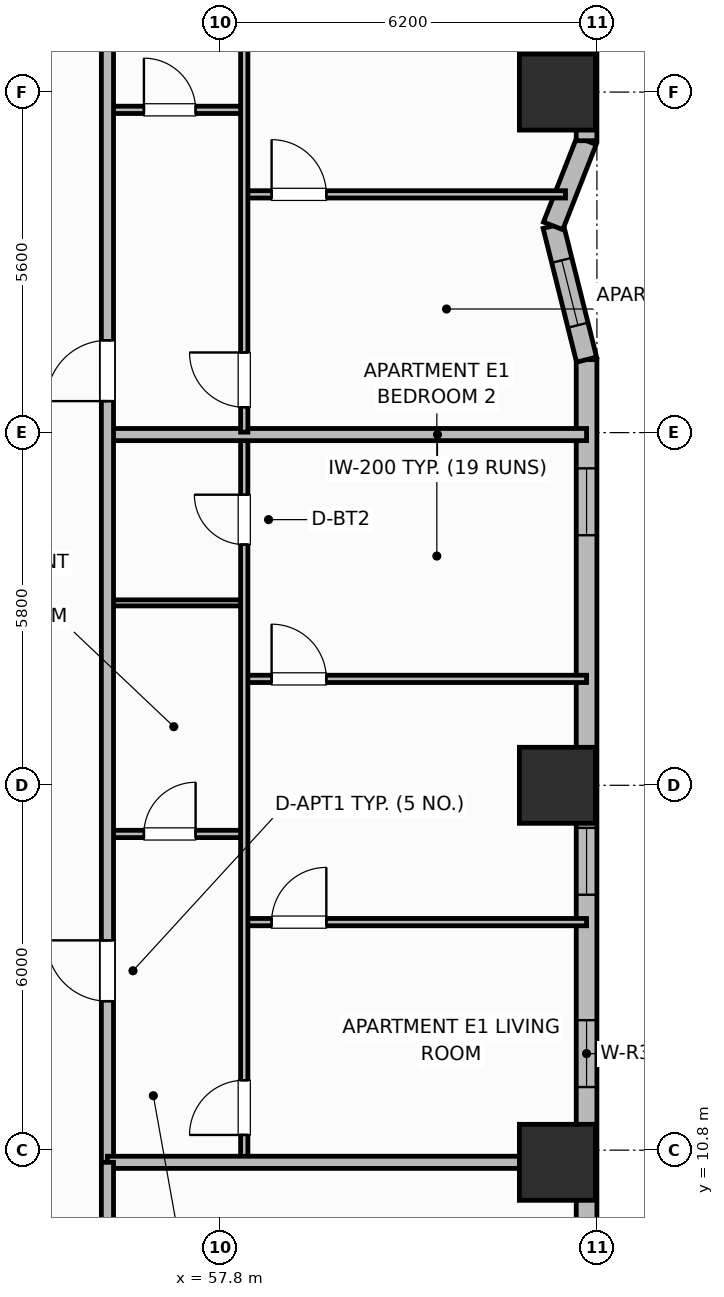
"""IFC4 building model, lengths in metres.
Left out: names, types, materials, properties, quantities, classifications, styles, units other than length and angle.
Written with IfcOpenShell. Run it as: python <this file> out.ifc"""

import sys

from ifc_helpers import new_model, si_unit, direction, frame, frame_2d, origin, origin_2d, place, context, subcontext, project, spatial, rectangle, extrude, element, fill, save


model = new_model("IFC4")
c1 = context("Model", 3, precision=1e-05, world=origin(), true_north=direction((0.0, 1.0)))
c2 = subcontext(c1, "Body", "Model", "MODEL_VIEW")
j1 = project(units=[si_unit("LENGTHUNIT", "METRE"), si_unit("PLANEANGLEUNIT", "RADIAN")], contexts=[c1])
p1 = place(None, origin())
s1 = spatial("IfcSite", under=j1, at=p1, CompositionType="ELEMENT")
p2 = place(p1, origin())
s2 = spatial("IfcBuilding", under=s1, at=p2, CompositionType="ELEMENT")
p3 = place(p2, frame((0.0, 0.0, 32.5)))
s3 = spatial("IfcBuildingStorey", under=s2, at=p3, CompositionType="ELEMENT", Elevation=32.5)
for number, where, z_axis, x_axis in (
    (1, (63.35, 10.6, 0.0), (0.0, 0.0, 1.0), (1.0, 0.0, 0.0)),
    (2, (63.35, 16.8, 0.0), (0.0, 0.0, 1.0), (1.0, 0.0, 0.0)),
    (3, (63.35, 28.2, 0.0), (0.0, 0.0, 1.0), (1.0, 0.0, 0.0)),
):
    element("IfcColumn", number, at=place(p3, frame(where, z_axis=z_axis, x_axis=x_axis)), inside=s3, PredefinedType="COLUMN", context=c2, shape_type="SweptSolid", body=[
        extrude(rectangle(XDim=1.25, YDim=1.25, at=origin_2d()), origin(), (0.0, 0.0, 1.0), 3.7),
    ])
p4 = place(p3, frame((63.83, 9.0, 0.0), z_axis=(0.0, 0.0, 1.0), x_axis=(0.0, 1.0, 0.0)))
e4 = element("IfcWall", 4, at=p4, inside=s3, PredefinedType="SOLIDWALL", context=c2, shape_type="SweptSolid", body=[
    extrude(rectangle(XDim=14.8, YDim=0.34, at=frame_2d((7.4, 0.0))), origin(), (0.0, 0.0, 1.0), 2.7),
])
p5 = place(p4, frame((2.837, 0.0, 0.93)))
e5 = element("IfcOpeningElement", 5, at=p5, cuts=e4, PredefinedType="OPENING", context=c2, shape_type="SweptSolid", body=[
    extrude(rectangle(XDim=1.1, YDim=1.65, at=frame_2d((0.55, 0.825))), frame((0.0, 0.18, 0.0), z_axis=(0.0, -1.0, 0.0), x_axis=(1.0, 0.0, 0.0)), (0.0, 0.0, 1.0), 0.36),
])
p6 = place(p4, frame((6.0, 0.0, 0.89)))
e6 = element("IfcOpeningElement", 6, at=p6, cuts=e4, PredefinedType="OPENING", context=c2, shape_type="SweptSolid", body=[
    extrude(rectangle(XDim=1.1, YDim=1.65, at=frame_2d((0.55, 0.825))), frame((0.0, 0.18, 0.0), z_axis=(0.0, -1.0, 0.0), x_axis=(1.0, 0.0, 0.0)), (0.0, 0.0, 1.0), 0.36),
])
p7 = place(p4, frame((11.913, 0.0, 0.93)))
e7 = element("IfcOpeningElement", 7, at=p7, cuts=e4, PredefinedType="OPENING", context=c2, shape_type="SweptSolid", body=[
    extrude(rectangle(XDim=1.1, YDim=1.65, at=frame_2d((0.55, 0.825))), frame((0.0, 0.18, 0.0), z_axis=(0.0, -1.0, 0.0), x_axis=(1.0, 0.0, 0.0)), (0.0, 0.0, 1.0), 0.36),
])
p8 = place(p3, frame((63.83, 23.8, 0.0), z_axis=(0.0, 0.0, 1.0), x_axis=(-0.242560957029, 0.970136166796, 0.0)))
e8 = element("IfcWall", 8, at=p8, inside=s3, PredefinedType="SOLIDWALL", context=c2, shape_type="SweptSolid", body=[
    extrude(rectangle(XDim=2.268, YDim=0.34, at=frame_2d((1.134, 0.0))), origin(), (0.0, 0.0, 1.0), 2.7),
])
p9 = place(p8, frame((0.584, 0.0, 0.89)))
e9 = element("IfcOpeningElement", 9, at=p9, cuts=e8, PredefinedType="OPENING", context=c2, shape_type="SweptSolid", body=[
    extrude(rectangle(XDim=1.1, YDim=1.65, at=frame_2d((0.55, 0.825))), frame((0.0, 0.18, 0.0), z_axis=(0.0, -1.0, 0.0), x_axis=(1.0, 0.0, 0.0)), (0.0, 0.0, 1.0), 0.36),
])
p10 = place(p3, frame((63.28, 26.0, 0.0), z_axis=(0.0, 0.0, 1.0), x_axis=(0.365702591843, 0.930731762818, 0.0)))
e10 = element("IfcWall", 10, at=p10, inside=s3, PredefinedType="SOLIDWALL", context=c2, shape_type="SweptSolid", body=[
    extrude(rectangle(XDim=1.504, YDim=0.34, at=frame_2d((0.752, 0.0))), origin(), (0.0, 0.0, 1.0), 2.7),
])
p11 = place(p3, frame((63.83, 27.4, 0.0), z_axis=(0.0, 0.0, 1.0), x_axis=(0.0, 1.0, 0.0)))
e11 = element("IfcWall", 11, at=p11, inside=s3, PredefinedType="SOLIDWALL", context=c2, shape_type="SweptSolid", body=[
    extrude(rectangle(XDim=1.6, YDim=0.34, at=frame_2d((0.8, 0.0))), origin(), (0.0, 0.0, 1.0), 2.7),
])
p12 = place(p3, frame((55.95, 16.0, 0.0), z_axis=(0.0, 0.0, 1.0), x_axis=(1.0, 0.0, 0.0)))
e12 = element("IfcWall", 12, at=p12, inside=s3, PredefinedType="PARTITIONING", context=c2, shape_type="SweptSolid", body=[
    extrude(rectangle(XDim=2.25, YDim=0.12, at=frame_2d((1.125, 0.0))), origin(), (0.0, 0.0, 1.0), 2.53),
])
p13 = place(p12, frame((0.6, 0.0, 0.0)))
e13 = element("IfcOpeningElement", 13, at=p13, cuts=e12, PredefinedType="OPENING", context=c2, shape_type="SweptSolid", body=[
    extrude(rectangle(XDim=0.85, YDim=2.1, at=frame_2d((0.425, 1.05))), frame((0.0, 0.07, 0.0), z_axis=(0.0, -1.0, 0.0), x_axis=(1.0, 0.0, 0.0)), (0.0, 0.0, 1.0), 0.14),
])
p14 = place(p3, frame((55.95, 19.8, 0.0), z_axis=(0.0, 0.0, 1.0), x_axis=(1.0, 0.0, 0.0)))
e14 = element("IfcWall", 14, at=p14, inside=s3, PredefinedType="PARTITIONING", context=c2, shape_type="SweptSolid", body=[
    extrude(rectangle(XDim=2.25, YDim=0.1, at=frame_2d((1.125, 0.0))), origin(), (0.0, 0.0, 1.0), 2.53),
])
p15 = place(p3, frame((58.2, 14.55, 0.0), z_axis=(0.0, 0.0, 1.0), x_axis=(1.0, 0.0, 0.0)))
e15 = element("IfcWall", 15, at=p15, inside=s3, PredefinedType="PARTITIONING", context=c2, shape_type="SweptSolid", body=[
    extrude(rectangle(XDim=5.63, YDim=0.12, at=frame_2d((2.815, 0.0))), origin(), (0.0, 0.0, 1.0), 2.53),
])
p16 = place(p15, frame((0.45, 0.0, 0.0)))
e16 = element("IfcOpeningElement", 16, at=p16, cuts=e15, PredefinedType="OPENING", context=c2, shape_type="SweptSolid", body=[
    extrude(rectangle(XDim=0.9, YDim=2.1, at=frame_2d((0.45, 1.05))), frame((0.0, 0.07, 0.0), z_axis=(0.0, -1.0, 0.0), x_axis=(1.0, 0.0, 0.0)), (0.0, 0.0, 1.0), 0.14),
])
p17 = place(p3, frame((58.2, 18.55, 0.0), z_axis=(0.0, 0.0, 1.0), x_axis=(1.0, 0.0, 0.0)))
e17 = element("IfcWall", 17, at=p17, inside=s3, PredefinedType="PARTITIONING", context=c2, shape_type="SweptSolid", body=[
    extrude(rectangle(XDim=5.63, YDim=0.12, at=frame_2d((2.815, 0.0))), origin(), (0.0, 0.0, 1.0), 2.53),
])
p18 = place(p17, frame((0.45, 0.0, 0.0)))
e18 = element("IfcOpeningElement", 18, at=p18, cuts=e17, PredefinedType="OPENING", context=c2, shape_type="SweptSolid", body=[
    extrude(rectangle(XDim=0.9, YDim=2.1, at=frame_2d((0.45, 1.05))), frame((0.0, 0.07, 0.0), z_axis=(0.0, -1.0, 0.0), x_axis=(1.0, 0.0, 0.0)), (0.0, 0.0, 1.0), 0.14),
])
p19 = place(p3, frame((58.2, 10.64, 0.0), z_axis=(0.0, 0.0, 1.0), x_axis=(0.0, 1.0, 0.0)))
e19 = element("IfcWall", 19, at=p19, inside=s3, PredefinedType="PARTITIONING", context=c2, shape_type="SweptSolid", body=[
    extrude(rectangle(XDim=11.888, YDim=0.12, at=frame_2d((5.944, 0.0))), origin(), (0.0, 0.0, 1.0), 2.53),
])
p20 = place(p19, frame((0.41, 0.0, 0.0)))
e20 = element("IfcOpeningElement", 20, at=p20, cuts=e19, PredefinedType="OPENING", context=c2, shape_type="SweptSolid", body=[
    extrude(rectangle(XDim=0.9, YDim=2.1, at=frame_2d((0.45, 1.05))), frame((0.0, 0.07, 0.0), z_axis=(0.0, -1.0, 0.0), x_axis=(1.0, 0.0, 0.0)), (0.0, 0.0, 1.0), 0.14),
])
p21 = place(p19, frame((10.119, 0.0, 0.0)))
e21 = element("IfcOpeningElement", 21, at=p21, cuts=e19, PredefinedType="OPENING", context=c2, shape_type="SweptSolid", body=[
    extrude(rectangle(XDim=0.82, YDim=2.08, at=frame_2d((0.41, 1.04))), frame((0.0, 0.07, 0.0), z_axis=(0.0, -1.0, 0.0), x_axis=(1.0, 0.0, 0.0)), (0.0, 0.0, 1.0), 0.14),
])
p22 = place(p3, frame((55.95, 22.568, 0.0), z_axis=(0.0, 0.0, 1.0), x_axis=(1.0, 0.0, 0.0)))
e22 = element("IfcWall", 22, at=p22, inside=s3, PredefinedType="PARTITIONING", context=c2, shape_type="SweptSolid", body=[
    extrude(rectangle(XDim=7.88, YDim=0.2, at=frame_2d((3.94, 0.0))), origin(), (0.0, 0.0, 1.0), 2.53),
])
p23 = place(p3, frame((55.95, 27.908, 0.0), z_axis=(0.0, 0.0, 1.0), x_axis=(1.0, 0.0, 0.0)))
e23 = element("IfcWall", 23, at=p23, inside=s3, PredefinedType="PARTITIONING", context=c2, shape_type="SweptSolid", body=[
    extrude(rectangle(XDim=2.25, YDim=0.12, at=frame_2d((1.125, 0.0))), origin(), (0.0, 0.0, 1.0), 2.53),
])
p24 = place(p23, frame((0.6, 0.0, 0.0)))
e24 = element("IfcOpeningElement", 24, at=p24, cuts=e23, PredefinedType="OPENING", context=c2, shape_type="SweptSolid", body=[
    extrude(rectangle(XDim=0.85, YDim=2.1, at=frame_2d((0.425, 1.05))), frame((0.0, 0.07, 0.0), z_axis=(0.0, -1.0, 0.0), x_axis=(1.0, 0.0, 0.0)), (0.0, 0.0, 1.0), 0.14),
])
p25 = place(p3, frame((58.2, 26.518, 0.0), z_axis=(0.0, 0.0, 1.0), x_axis=(1.0, 0.0, 0.0)))
e25 = element("IfcWall", 25, at=p25, inside=s3, PredefinedType="PARTITIONING", context=c2, shape_type="SweptSolid", body=[
    extrude(rectangle(XDim=5.283, YDim=0.12, at=frame_2d((2.642, 0.0))), origin(), (0.0, 0.0, 1.0), 2.53),
])
p26 = place(p25, frame((0.45, 0.0, 0.0)))
e26 = element("IfcOpeningElement", 26, at=p26, cuts=e25, PredefinedType="OPENING", context=c2, shape_type="SweptSolid", body=[
    extrude(rectangle(XDim=0.9, YDim=2.1, at=frame_2d((0.45, 1.05))), frame((0.0, 0.07, 0.0), z_axis=(0.0, -1.0, 0.0), x_axis=(1.0, 0.0, 0.0)), (0.0, 0.0, 1.0), 0.14),
])
p27 = place(p3, frame((58.2, 22.608, 0.0), z_axis=(0.0, 0.0, 1.0), x_axis=(0.0, 1.0, 0.0)))
e27 = element("IfcWall", 27, at=p27, inside=s3, PredefinedType="PARTITIONING", context=c2, shape_type="SweptSolid", body=[
    extrude(rectangle(XDim=11.052, YDim=0.12, at=frame_2d((5.526, 0.0))), origin(), (0.0, 0.0, 1.0), 2.53),
])
p28 = place(p27, frame((0.41, 0.0, 0.0)))
e28 = element("IfcOpeningElement", 28, at=p28, cuts=e27, PredefinedType="OPENING", context=c2, shape_type="SweptSolid", body=[
    extrude(rectangle(XDim=0.9, YDim=2.1, at=frame_2d((0.45, 1.05))), frame((0.0, 0.07, 0.0), z_axis=(0.0, -1.0, 0.0), x_axis=(1.0, 0.0, 0.0)), (0.0, 0.0, 1.0), 0.14),
])
p29 = place(p3, frame((55.95, 10.6, 0.0), z_axis=(0.0, 0.0, 1.0), x_axis=(0.0, 1.0, 0.0)))
e29 = element("IfcWall", 29, at=p29, inside=s3, PredefinedType="PARTITIONING", context=c2, shape_type="SweptSolid", body=[
    extrude(rectangle(XDim=35.2, YDim=0.2, at=frame_2d((17.6, 0.0))), origin(), (0.0, 0.0, 1.0), 2.53),
])
p30 = place(p29, frame((2.65, 0.0, 0.0)))
e30 = element("IfcOpeningElement", 30, at=p30, cuts=e29, PredefinedType="OPENING", context=c2, shape_type="SweptSolid", body=[
    extrude(rectangle(XDim=1.0, YDim=2.15, at=frame_2d((0.5, 1.075))), frame((0.0, 0.11, 0.0), z_axis=(0.0, -1.0, 0.0), x_axis=(1.0, 0.0, 0.0)), (0.0, 0.0, 1.0), 0.22),
])
p31 = place(p29, frame((12.518, 0.0, 0.0)))
e31 = element("IfcOpeningElement", 31, at=p31, cuts=e29, PredefinedType="OPENING", context=c2, shape_type="SweptSolid", body=[
    extrude(rectangle(XDim=1.0, YDim=2.15, at=frame_2d((0.5, 1.075))), frame((0.0, 0.11, 0.0), z_axis=(0.0, -1.0, 0.0), x_axis=(1.0, 0.0, 0.0)), (0.0, 0.0, 1.0), 0.22),
])
p32 = place(p29, frame((23.65, 0.0, 0.0)))
e32 = element("IfcOpeningElement", 32, at=p32, cuts=e29, PredefinedType="OPENING", context=c2, shape_type="SweptSolid", body=[
    extrude(rectangle(XDim=1.0, YDim=2.15, at=frame_2d((0.5, 1.075))), frame((0.0, 0.11, 0.0), z_axis=(0.0, -1.0, 0.0), x_axis=(1.0, 0.0, 0.0)), (0.0, 0.0, 1.0), 0.22),
])
p33 = place(p3, frame((55.95, 10.6, 0.0), z_axis=(0.0, 0.0, 1.0), x_axis=(1.0, 0.0, 0.0)))
e33 = element("IfcWall", 33, at=p33, inside=s3, PredefinedType="PARTITIONING", context=c2, shape_type="SweptSolid", body=[
    extrude(rectangle(XDim=7.46, YDim=0.2, at=frame_2d((3.73, 0.0))), origin(), (0.0, 0.0, 1.0), 2.53),
])
p34 = place(p3, frame((55.95, 4.97, 0.0), z_axis=(0.0, 0.0, 1.0), x_axis=(0.0, 1.0, 0.0)))
e34 = element("IfcWall", 34, at=p34, inside=s3, PredefinedType="PARTITIONING", context=c2, shape_type="SweptSolid", body=[
    extrude(rectangle(XDim=5.63, YDim=0.2, at=frame_2d((2.815, 0.0))), origin(), (0.0, 0.0, 1.0), 2.53),
])
p35 = place(p5, origin())
e35 = element("IfcWindow", 35, at=p35, inside=s3, PartitioningType="SINGLE_PANEL", PredefinedType="WINDOW", context=c2, shape_type="SweptSolid", body=[
    extrude(rectangle(XDim=1.1, YDim=1.65, at=frame_2d((0.55, 0.825))), frame((0.0, 0.03, 0.0), z_axis=(0.0, -1.0, 0.0), x_axis=(1.0, 0.0, 0.0)), (0.0, 0.0, 1.0), 0.06),
])
fill(e5, e35)
p36 = place(p6, origin())
e36 = element("IfcWindow", 36, at=p36, inside=s3, PartitioningType="SINGLE_PANEL", PredefinedType="WINDOW", context=c2, shape_type="SweptSolid", body=[
    extrude(rectangle(XDim=1.1, YDim=1.65, at=frame_2d((0.55, 0.825))), frame((0.0, 0.03, 0.0), z_axis=(0.0, -1.0, 0.0), x_axis=(1.0, 0.0, 0.0)), (0.0, 0.0, 1.0), 0.06),
])
fill(e6, e36)
p37 = place(p7, origin())
e37 = element("IfcWindow", 37, at=p37, inside=s3, PartitioningType="SINGLE_PANEL", PredefinedType="WINDOW", context=c2, shape_type="SweptSolid", body=[
    extrude(rectangle(XDim=1.1, YDim=1.65, at=frame_2d((0.55, 0.825))), frame((0.0, 0.03, 0.0), z_axis=(0.0, -1.0, 0.0), x_axis=(1.0, 0.0, 0.0)), (0.0, 0.0, 1.0), 0.06),
])
fill(e7, e37)
p38 = place(p9, origin())
e38 = element("IfcWindow", 38, at=p38, inside=s3, PartitioningType="SINGLE_PANEL", PredefinedType="WINDOW", context=c2, shape_type="SweptSolid", body=[
    extrude(rectangle(XDim=1.1, YDim=1.65, at=frame_2d((0.55, 0.825))), frame((0.0, 0.03, 0.0), z_axis=(0.0, -1.0, 0.0), x_axis=(1.0, 0.0, 0.0)), (0.0, 0.0, 1.0), 0.06),
])
fill(e9, e38)
p39 = place(p13, origin())
e39 = element("IfcDoor", 39, at=p39, inside=s3, OperationType="SINGLE_SWING_RIGHT", PredefinedType="DOOR", context=c2, shape_type="SweptSolid", body=[
    extrude(rectangle(XDim=0.85, YDim=2.1, at=frame_2d((0.425, 1.05))), frame((0.0, 0.025, 0.0), z_axis=(0.0, -1.0, 0.0), x_axis=(1.0, 0.0, 0.0)), (0.0, 0.0, 1.0), 0.05),
])
fill(e13, e39)
p40 = place(p16, origin())
e40 = element("IfcDoor", 40, at=p40, inside=s3, OperationType="SINGLE_SWING_RIGHT", PredefinedType="DOOR", context=c2, shape_type="SweptSolid", body=[
    extrude(rectangle(XDim=0.9, YDim=2.1, at=frame_2d((0.45, 1.05))), frame((0.0, 0.025, 0.0), z_axis=(0.0, -1.0, 0.0), x_axis=(1.0, 0.0, 0.0)), (0.0, 0.0, 1.0), 0.05),
])
fill(e16, e40)
p41 = place(p18, origin())
e41 = element("IfcDoor", 41, at=p41, inside=s3, OperationType="SINGLE_SWING_LEFT", PredefinedType="DOOR", context=c2, shape_type="SweptSolid", body=[
    extrude(rectangle(XDim=0.9, YDim=2.1, at=frame_2d((0.45, 1.05))), frame((0.0, 0.025, 0.0), z_axis=(0.0, -1.0, 0.0), x_axis=(1.0, 0.0, 0.0)), (0.0, 0.0, 1.0), 0.05),
])
fill(e18, e41)
p42 = place(p20, origin())
e42 = element("IfcDoor", 42, at=p42, inside=s3, OperationType="SINGLE_SWING_LEFT", PredefinedType="DOOR", context=c2, shape_type="SweptSolid", body=[
    extrude(rectangle(XDim=0.9, YDim=2.1, at=frame_2d((0.45, 1.05))), frame((0.0, 0.025, 0.0), z_axis=(0.0, -1.0, 0.0), x_axis=(1.0, 0.0, 0.0)), (0.0, 0.0, 1.0), 0.05),
])
fill(e20, e42)
p43 = place(p21, origin())
e43 = element("IfcDoor", 43, at=p43, inside=s3, OperationType="SINGLE_SWING_RIGHT", PredefinedType="DOOR", context=c2, shape_type="SweptSolid", body=[
    extrude(rectangle(XDim=0.82, YDim=2.08, at=frame_2d((0.41, 1.04))), frame((0.0, 0.025, 0.0), z_axis=(0.0, -1.0, 0.0), x_axis=(1.0, 0.0, 0.0)), (0.0, 0.0, 1.0), 0.05),
])
fill(e21, e43)
p44 = place(p24, origin())
e44 = element("IfcDoor", 44, at=p44, inside=s3, OperationType="SINGLE_SWING_LEFT", PredefinedType="DOOR", context=c2, shape_type="SweptSolid", body=[
    extrude(rectangle(XDim=0.85, YDim=2.1, at=frame_2d((0.425, 1.05))), frame((0.0, 0.025, 0.0), z_axis=(0.0, -1.0, 0.0), x_axis=(1.0, 0.0, 0.0)), (0.0, 0.0, 1.0), 0.05),
])
fill(e24, e44)
p45 = place(p26, origin())
e45 = element("IfcDoor", 45, at=p45, inside=s3, OperationType="SINGLE_SWING_LEFT", PredefinedType="DOOR", context=c2, shape_type="SweptSolid", body=[
    extrude(rectangle(XDim=0.9, YDim=2.1, at=frame_2d((0.45, 1.05))), frame((0.0, 0.025, 0.0), z_axis=(0.0, -1.0, 0.0), x_axis=(1.0, 0.0, 0.0)), (0.0, 0.0, 1.0), 0.05),
])
fill(e26, e45)
p46 = place(p28, origin())
e46 = element("IfcDoor", 46, at=p46, inside=s3, OperationType="SINGLE_SWING_RIGHT", PredefinedType="DOOR", context=c2, shape_type="SweptSolid", body=[
    extrude(rectangle(XDim=0.9, YDim=2.1, at=frame_2d((0.45, 1.05))), frame((0.0, 0.025, 0.0), z_axis=(0.0, -1.0, 0.0), x_axis=(1.0, 0.0, 0.0)), (0.0, 0.0, 1.0), 0.05),
])
fill(e28, e46)
p47 = place(p30, origin())
e47 = element("IfcDoor", 47, at=p47, inside=s3, OperationType="SINGLE_SWING_RIGHT", PredefinedType="DOOR", context=c2, shape_type="SweptSolid", body=[
    extrude(rectangle(XDim=1.0, YDim=2.15, at=frame_2d((0.5, 1.075))), frame((0.0, 0.025, 0.0), z_axis=(0.0, -1.0, 0.0), x_axis=(1.0, 0.0, 0.0)), (0.0, 0.0, 1.0), 0.05),
])
fill(e30, e47)
p48 = place(p31, origin())
e48 = element("IfcDoor", 48, at=p48, inside=s3, OperationType="SINGLE_SWING_LEFT", PredefinedType="DOOR", context=c2, shape_type="SweptSolid", body=[
    extrude(rectangle(XDim=1.0, YDim=2.15, at=frame_2d((0.5, 1.075))), frame((0.0, 0.025, 0.0), z_axis=(0.0, -1.0, 0.0), x_axis=(1.0, 0.0, 0.0)), (0.0, 0.0, 1.0), 0.05),
])
fill(e31, e48)
save(model, sys.argv[1])
